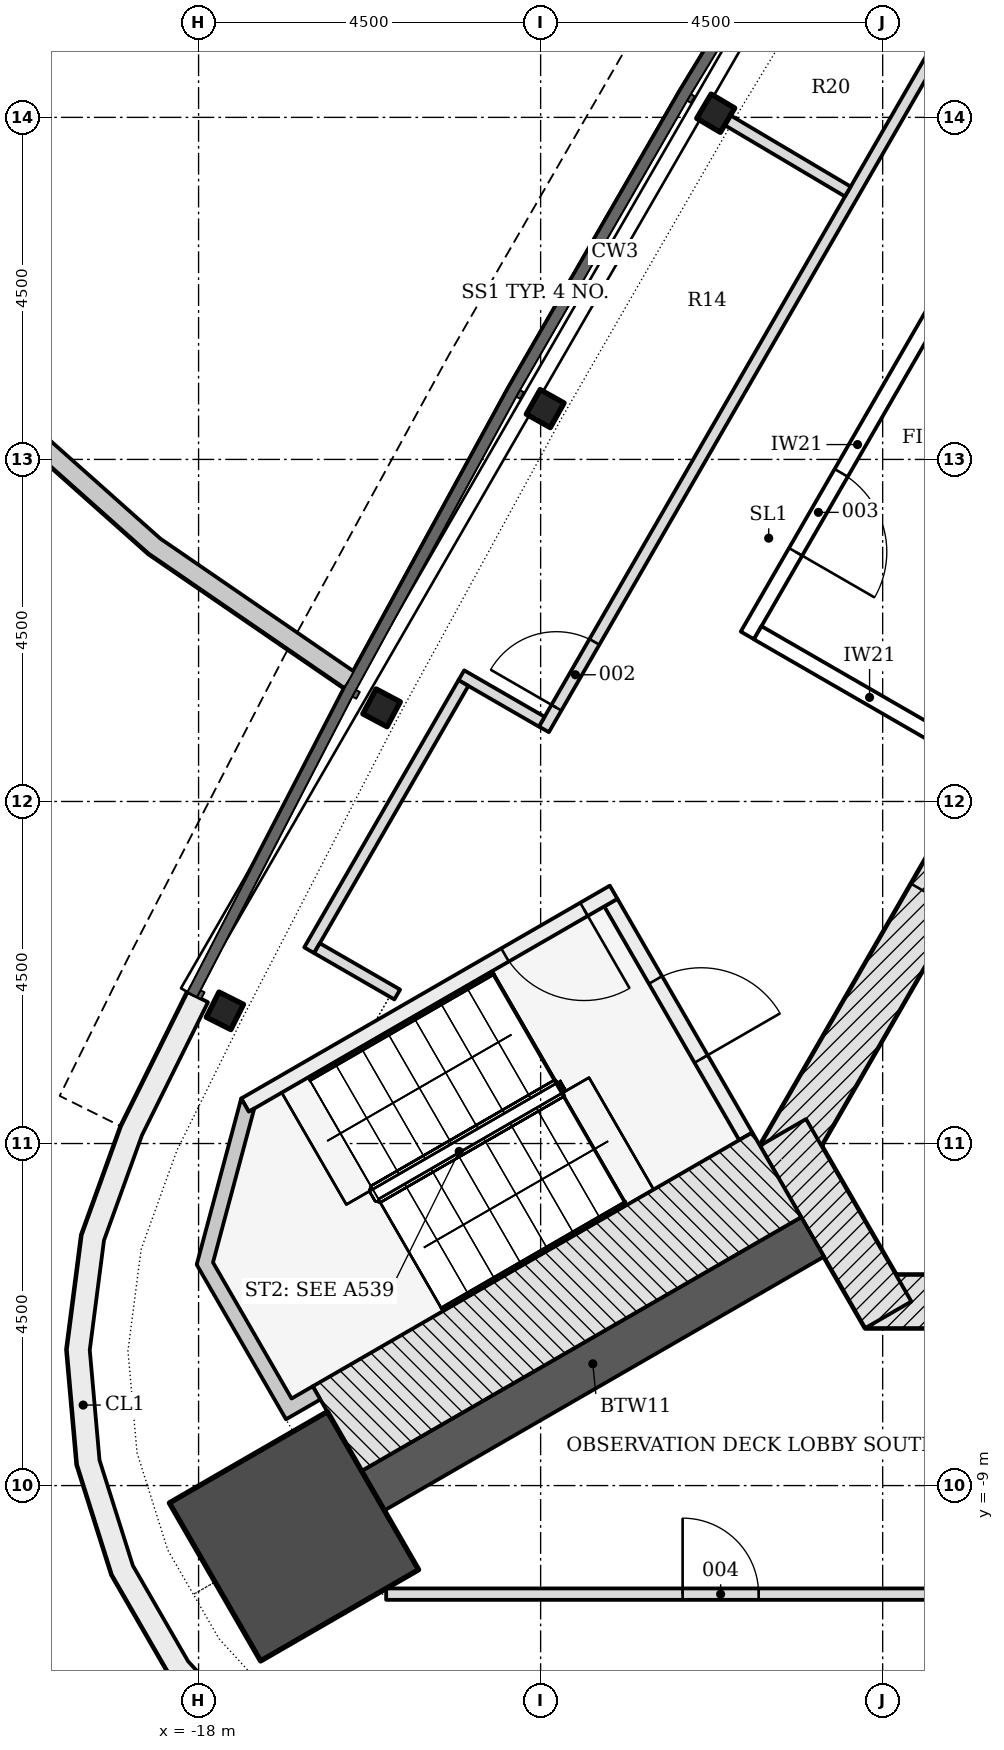
"""IFC4 building model, lengths in metres.
Left out: names, types, materials, properties, quantities, classifications, styles, units other than length and angle.
Written with IfcOpenShell. Run it as: python <this file> out.ifc"""

import sys

from ifc_helpers import new_model, si_unit, direction, frame, frame_2d, origin, origin_2d, place, context, subcontext, project, spatial, polyline, rectangle, i_section, outline, extrude, element, fill, save


model = new_model("IFC4")
c1 = context("Model", 3, precision=1e-05, world=origin(), true_north=direction((0.0, 1.0)))
c2 = subcontext(c1, "Body", "Model", "MODEL_VIEW")
j1 = project(units=[si_unit("LENGTHUNIT", "METRE"), si_unit("PLANEANGLEUNIT", "RADIAN")], contexts=[c1])
p1 = place(None, origin())
s1 = spatial("IfcSite", under=j1, at=p1, CompositionType="ELEMENT")
p2 = place(p1, origin())
s2 = spatial("IfcBuilding", under=s1, at=p2, CompositionType="ELEMENT")
p3 = place(p2, frame((0.0, 0.0, 274.2)))
s3 = spatial("IfcBuildingStorey", under=s2, at=p3, CompositionType="ELEMENT", Elevation=274.2)
p4 = place(p3, frame((-9.229, -6.578, -0.2), z_axis=(0.0, 0.0, 1.0), x_axis=(1.0, 0.0, 0.0)))
e1 = element("IfcWall", 1, at=p4, inside=s3, PredefinedType="SHEAR", context=c2, shape_type="SweptSolid", body=[
    extrude(rectangle(XDim=18.458, YDim=0.7, at=frame_2d((9.229, 0.0))), origin(), (0.0, 0.0, 1.0), 5.35),
])
p5 = place(p4, frame((8.7, 0.0, 0.2)))
e2 = element("IfcOpeningElement", 2, at=p5, cuts=e1, PredefinedType="OPENING", context=c2, shape_type="SweptSolid", body=[
    extrude(rectangle(XDim=1.0, YDim=2.1, at=frame_2d((0.5, 1.05))), frame((0.0, 0.36, 0.0), z_axis=(0.0, -1.0, 0.0), x_axis=(1.0, 0.0, 0.0)), (0.0, 0.0, 1.0), 0.72),
])
p6 = place(p4, frame((3.99, 0.0, 0.2)))
e3 = element("IfcOpeningElement", 3, at=p6, cuts=e1, PredefinedType="OPENING", context=c2, shape_type="SweptSolid", body=[
    extrude(rectangle(XDim=0.9, YDim=2.1, at=frame_2d((0.45, 1.05))), frame((0.0, 0.36, 0.0), z_axis=(0.0, -1.0, 0.0), x_axis=(1.0, 0.0, 0.0)), (0.0, 0.0, 1.0), 0.72),
])
p7 = place(p4, frame((13.539, 0.0, 0.2)))
e4 = element("IfcOpeningElement", 4, at=p7, cuts=e1, PredefinedType="OPENING", context=c2, shape_type="SweptSolid", body=[
    extrude(rectangle(XDim=0.9, YDim=2.1, at=frame_2d((0.45, 1.05))), frame((0.0, 0.36, 0.0), z_axis=(0.0, -1.0, 0.0), x_axis=(1.0, 0.0, 0.0)), (0.0, 0.0, 1.0), 0.72),
])
p8 = place(p3, frame((-1.083, 11.281, -0.2), z_axis=(0.0, 0.0, 1.0), x_axis=(-0.500001446645, -0.866024568562, 0.0)))
e5 = element("IfcWall", 5, at=p8, inside=s3, PredefinedType="SHEAR", context=c2, shape_type="SweptSolid", body=[
    extrude(rectangle(XDim=18.458, YDim=0.7, at=frame_2d((9.229, 0.0))), origin(), (0.0, 0.0, 1.0), 5.35),
])
p9 = place(p8, frame((8.979, 0.0, 0.2)))
e6 = element("IfcOpeningElement", 6, at=p9, cuts=e5, PredefinedType="OPENING", context=c2, shape_type="SweptSolid", body=[
    extrude(rectangle(XDim=1.2, YDim=2.1, at=frame_2d((0.6, 1.05))), frame((0.0, 0.36, 0.0), z_axis=(0.0, -1.0, 0.0), x_axis=(1.0, 0.0, 0.0)), (0.0, 0.0, 1.0), 0.72),
])
p10 = place(p8, frame((11.029, 0.0, 0.2)))
e7 = element("IfcOpeningElement", 7, at=p10, cuts=e5, PredefinedType="OPENING", context=c2, shape_type="SweptSolid", body=[
    extrude(rectangle(XDim=1.2, YDim=2.1, at=frame_2d((0.6, 1.05))), frame((0.0, 0.36, 0.0), z_axis=(0.0, -1.0, 0.0), x_axis=(1.0, 0.0, 0.0)), (0.0, 0.0, 1.0), 0.72),
])
p11 = place(p8, frame((13.179, 0.0, 0.2)))
e8 = element("IfcOpeningElement", 8, at=p11, cuts=e5, PredefinedType="OPENING", context=c2, shape_type="SweptSolid", body=[
    extrude(rectangle(XDim=1.3, YDim=2.1, at=frame_2d((0.65, 1.05))), frame((0.0, 0.36, 0.0), z_axis=(0.0, -1.0, 0.0), x_axis=(1.0, 0.0, 0.0)), (0.0, 0.0, 1.0), 0.72),
])
p12 = place(p3, frame((-10.311, -4.353, -0.2), z_axis=(0.0, 0.0, 1.0), x_axis=(0.500042739161, -0.866000726912, 0.0)))
e9 = element("IfcWall", 9, at=p12, inside=s3, PredefinedType="SHEAR", context=c2, shape_type="SweptSolid", body=[
    extrude(rectangle(XDim=2.771, YDim=0.7, at=frame_2d((1.386, 0.0))), origin(), (0.0, 0.0, 1.0), 5.35),
])
p13 = place(p3, frame((-9.922, -5.728, -0.2), z_axis=(0.0, 0.0, 1.0), x_axis=(-0.866032176823, -0.499988268569, 0.0)))
e10 = element("IfcWall", 10, at=p13, inside=s3, PredefinedType="SHEAR", context=c2, shape_type="SweptSolid", body=[
    extrude(rectangle(XDim=6.678, YDim=0.6, at=frame_2d((3.339, 0.0))), origin(), (0.0, 0.0, 1.0), 5.35),
])
p14 = place(p3, frame((-16.745, -9.667, -0.2), z_axis=(0.0, 0.0, 1.0), x_axis=(-0.866025403784, -0.5, 0.0)))
e11 = element("IfcColumn", 11, at=p14, inside=s3, PredefinedType="COLUMN", context=c2, shape_type="SweptSolid", body=[
    extrude(rectangle(XDim=2.4, YDim=2.4, at=origin_2d()), origin(), (0.0, 0.0, 1.0), 5.35),
])
for number, where, z_axis, x_axis in (
    (12, (-11.196, 9.055, -0.2), (0.0, 0.0, 1.0), (-0.51, -0.86, 0.0)),
    (13, (-13.44, 5.169, -0.2), (0.0, 0.0, 1.0), (-0.49, -0.872, 0.0)),
    (14, (-15.593, 1.232, -0.2), (0.0, 0.0, 1.0), (-0.47, -0.883, 0.0)),
    (15, (-17.654, -2.754, -0.2), (0.0, 0.0, 1.0), (-0.449, -0.894, 0.0)),
):
    element("IfcColumn", number, at=place(p3, frame(where, z_axis=z_axis, x_axis=x_axis)), inside=s3, PredefinedType="COLUMN", context=c2, shape_type="SweptSolid", body=[
        extrude(i_section(OverallWidth=0.371, OverallDepth=0.361, WebThickness=0.012, FlangeThickness=0.02, FilletRadius=0.015, at=origin_2d()), origin(), (0.0, 0.0, 1.0), 5.35),
    ])
p15 = place(p3, origin())
e16 = element("IfcWall", 16, at=p15, inside=s3, PredefinedType="NOTDEFINED", context=c2, shape_type="SweptSolid", body=[
    extrude(outline(polyline([(-18.145, -2.507), (-19.021, -4.273), (-19.538, -5.703), (-19.733, -7.21), (-19.599, -8.724), (-19.141, -10.174), (-18.381, -11.49), (-17.355, -12.611), (-16.111, -13.485), (-14.708, -14.069), (-13.211, -14.336), (-11.244, -14.46), (-11.225, -14.161), (-13.176, -14.038), (-14.623, -13.779), (-15.965, -13.22), (-17.156, -12.385), (-18.138, -11.312), (-18.865, -10.052), (-19.303, -8.665), (-19.432, -7.216), (-19.244, -5.774), (-18.745, -4.391), (-17.876, -2.64), (-18.145, -2.507)])), origin(), (0.0, 0.0, 1.0), 5.15),
])
p16 = place(p3, origin())
e17 = element("IfcWall", 17, at=p16, inside=s3, PredefinedType="PARAPET", context=c2, shape_type="SweptSolid", body=[
    extrude(outline(polyline([(-5.81, 18.61), (-8.585, 20.051), (-11.451, 21.107), (-14.298, 21.739), (-17.016, 21.922), (-19.5, 21.648), (-21.656, 20.929), (-23.4, 19.792), (-24.665, 18.28), (-25.403, 16.452), (-25.585, 14.378), (-25.205, 12.137), (-24.277, 9.817), (-22.836, 7.505), (-20.938, 5.291), (-18.656, 3.26), (-16.078, 1.49), (-15.937, 1.696), (-18.502, 3.457), (-20.759, 5.467), (-22.634, 7.653), (-24.053, 9.93), (-24.963, 12.205), (-25.333, 14.388), (-25.157, 16.393), (-24.448, 18.15), (-23.232, 19.603), (-21.546, 20.702), (-19.446, 21.403), (-17.01, 21.671), (-14.334, 21.491), (-11.522, 20.867), (-8.687, 19.822), (-5.925, 18.388), (-5.81, 18.61)])), origin(), (0.0, 0.0, 1.0), 1.1),
])
p17 = place(p3, frame((-12.576, -1.331, -0.2), z_axis=(0.0, 0.0, 1.0), x_axis=(0.499970499736, -0.8660424351, 0.0)))
e18 = element("IfcWall", 18, at=p17, inside=s3, PredefinedType="SHEAR", context=c2, shape_type="SweptSolid", body=[
    extrude(rectangle(XDim=3.55, YDim=0.2, at=frame_2d((1.775, 0.0))), origin(), (0.0, 0.0, 1.0), 5.35),
])
p18 = place(p17, frame((1.175, 0.0, 0.2)))
e19 = element("IfcOpeningElement", 19, at=p18, cuts=e18, PredefinedType="OPENING", context=c2, shape_type="SweptSolid", body=[
    extrude(rectangle(XDim=1.2, YDim=2.1, at=frame_2d((0.6, 1.05))), frame((0.0, 0.11, 0.0), z_axis=(0.0, -1.0, 0.0), x_axis=(1.0, 0.0, 0.0)), (0.0, 0.0, 1.0), 0.22),
])
p19 = place(p3, frame((-12.539, -1.194, -0.2), z_axis=(0.0, 0.0, 1.0), x_axis=(-0.866045472092, -0.499965239061, 0.0)))
e20 = element("IfcWall", 20, at=p19, inside=s3, PredefinedType="SHEAR", context=c2, shape_type="SweptSolid", body=[
    extrude(rectangle(XDim=5.6, YDim=0.2, at=frame_2d((2.8, 0.0))), origin(), (0.0, 0.0, 1.0), 5.35),
])
p20 = place(p19, frame((0.45, 0.0, 0.2)))
e21 = element("IfcOpeningElement", 21, at=p20, cuts=e20, PredefinedType="OPENING", context=c2, shape_type="SweptSolid", body=[
    extrude(rectangle(XDim=1.2, YDim=2.1, at=frame_2d((0.6, 1.05))), frame((0.0, 0.11, 0.0), z_axis=(0.0, -1.0, 0.0), x_axis=(1.0, 0.0, 0.0)), (0.0, 0.0, 1.0), 0.22),
])
p21 = place(p3, frame((-10.393, -4.912, -0.2), z_axis=(0.0, 0.0, 1.0), x_axis=(-0.866025486527, -0.499999856685, 0.0)))
e22 = element("IfcWall", 22, at=p21, inside=s3, PredefinedType="SHEAR", context=c2, shape_type="SweptSolid", body=[
    extrude(rectangle(XDim=6.679, YDim=1.286, at=frame_2d((3.339, 0.0))), origin(), (0.0, 0.0, 1.0), 5.35),
])
p22 = place(p3, frame((0.0, 0.0, -0.2)))
e23 = element("IfcWall", 23, at=p22, inside=s3, PredefinedType="SHEAR", context=c2, shape_type="SweptSolid", body=[
    extrude(outline(polyline([(-17.439, -3.907), (-18.025, -6.093), (-16.85, -8.128), (-16.398, -7.867), (-16.498, -7.694), (-16.498, -7.694), (-16.777, -7.855), (-17.81, -6.065), (-17.267, -4.039), (-17.339, -4.081), (-17.339, -4.081), (-17.339, -4.081), (-17.339, -4.081), (-17.339, -4.081), (-17.339, -4.081), (-17.339, -4.081), (-17.339, -4.081), (-17.339, -4.081), (-17.339, -4.081), (-17.339, -4.081), (-17.339, -4.081), (-17.339, -4.081), (-17.339, -4.081), (-17.339, -4.081), (-17.339, -4.081), (-17.339, -4.081), (-17.439, -3.907)])), origin(), (0.0, 0.0, 1.0), 5.35),
])
p23 = place(p3, frame((-7.881, 7.206, 0.0), z_axis=(0.0, 0.0, 1.0), x_axis=(-0.499988536525, -0.866032022124, 0.0)))
e24 = element("IfcWall", 24, at=p23, inside=s3, PredefinedType="PARTITIONING", context=c2, shape_type="SweptSolid", body=[
    extrude(rectangle(XDim=5.798, YDim=0.2, at=frame_2d((2.899, 0.0))), origin(), (0.0, 0.0, 1.0), 4.602),
])
p24 = place(p23, frame((3.329, 0.0, 0.0)))
e25 = element("IfcOpeningElement", 25, at=p24, cuts=e24, PredefinedType="OPENING", context=c2, shape_type="SweptSolid", body=[
    extrude(rectangle(XDim=1.2, YDim=2.1, at=frame_2d((0.6, 1.05))), frame((0.0, 0.11, 0.0), z_axis=(0.0, -1.0, 0.0), x_axis=(1.0, 0.0, 0.0)), (0.0, 0.0, 1.0), 0.22),
])
p25 = place(p3, frame((-10.645, 2.219, 0.0), z_axis=(0.0, 0.0, 1.0), x_axis=(0.866038511948, -0.499977295307, 0.0)))
e26 = element("IfcWall", 26, at=p25, inside=s3, PredefinedType="PARTITIONING", context=c2, shape_type="SweptSolid", body=[
    extrude(rectangle(XDim=3.4, YDim=0.2, at=frame_2d((1.7, 0.0))), origin(), (0.0, 0.0, 1.0), 5.15),
])
p26 = place(p3, frame((-13.457, 0.949, 0.0), z_axis=(0.0, 0.0, 1.0), x_axis=(0.500001340499, 0.866024629845, 0.0)))
e27 = element("IfcWall", 27, at=p26, inside=s3, PredefinedType="PARTITIONING", context=c2, shape_type="SweptSolid", body=[
    extrude(rectangle(XDim=22.632, YDim=0.15, at=frame_2d((11.316, 0.0))), origin(), (0.0, 0.0, 1.0), 4.602),
])
p27 = place(p26, frame((14.943, 0.0, 0.0)))
e28 = element("IfcOpeningElement", 28, at=p27, cuts=e27, PredefinedType="OPENING", context=c2, shape_type="SweptSolid", body=[
    extrude(rectangle(XDim=1.0, YDim=2.1, at=frame_2d((0.5, 1.05))), frame((0.0, 0.085, 0.0), z_axis=(0.0, -1.0, 0.0), x_axis=(1.0, 0.0, 0.0)), (0.0, 0.0, 1.0), 0.17),
])
p28 = place(p26, frame((0.329, 0.0, 0.0)))
e29 = element("IfcOpeningElement", 29, at=p28, cuts=e27, PredefinedType="OPENING", context=c2, shape_type="SweptSolid", body=[
    extrude(rectangle(XDim=1.0, YDim=2.1, at=frame_2d((0.5, 1.05))), frame((0.0, 0.085, 0.0), z_axis=(0.0, -1.0, 0.0), x_axis=(1.0, 0.0, 0.0)), (0.0, 0.0, 1.0), 0.17),
])
p29 = place(p3, frame((-11.046, 8.966, 0.0), z_axis=(0.0, 0.0, 1.0), x_axis=(0.860132404911, -0.510070824516, 0.0)))
e30 = element("IfcWall", 30, at=p29, inside=s3, PredefinedType="PARTITIONING", context=c2, shape_type="SweptSolid", body=[
    extrude(rectangle(XDim=1.845, YDim=0.15, at=frame_2d((0.922, 0.0))), origin(), (0.0, 0.0, 1.0), 4.602),
])
p30 = place(p3, frame((-13.485, 1.05, 0.0), z_axis=(0.0, 0.0, 1.0), x_axis=(-0.865995866851, 0.50005115598, 0.0)))
e31 = element("IfcWall", 31, at=p30, inside=s3, PredefinedType="PARTITIONING", context=c2, shape_type="SweptSolid", body=[
    extrude(rectangle(XDim=1.221, YDim=0.15, at=frame_2d((0.611, 0.0))), origin(), (0.0, 0.0, 1.0), 5.15),
])
p31 = place(p3, frame((-14.516, 1.558, 0.0), z_axis=(0.0, 0.0, 1.0), x_axis=(-0.499994954979, -0.866028316509, 0.0)))
e32 = element("IfcWall", 32, at=p31, inside=s3, PredefinedType="PARTITIONING", context=c2, shape_type="SweptSolid", body=[
    extrude(rectangle(XDim=4.059, YDim=0.15, at=frame_2d((2.029, 0.0))), origin(), (0.0, 0.0, 1.0), 4.602),
])
p32 = place(p3, frame((-16.443, -1.93, 0.0), z_axis=(0.0, 0.0, 1.0), x_axis=(0.866042269935, -0.499970785833, 0.0)))
e33 = element("IfcWall", 33, at=p32, inside=s3, PredefinedType="PARTITIONING", context=c2, shape_type="SweptSolid", body=[
    extrude(rectangle(XDim=1.22, YDim=0.15, at=frame_2d((0.61, 0.0))), origin(), (0.0, 0.0, 1.0), 5.15),
])
p33 = place(p3, frame((-15.532, -10.428, 0.0), z_axis=(0.0, 0.0, 1.0), x_axis=(1.0, 0.0, 0.0)))
e34 = element("IfcWall", 34, at=p33, inside=s3, PredefinedType="PARTITIONING", context=c2, shape_type="SweptSolid", body=[
    extrude(rectangle(XDim=21.439, YDim=0.15, at=frame_2d((10.719, 0.0))), origin(), (0.0, 0.0, 1.0), 4.602),
])
p34 = place(p33, frame((3.901, 0.0, 0.0)))
e35 = element("IfcOpeningElement", 35, at=p34, cuts=e34, PredefinedType="OPENING", context=c2, shape_type="SweptSolid", body=[
    extrude(rectangle(XDim=1.0, YDim=2.1, at=frame_2d((0.5, 1.05))), frame((0.0, 0.085, 0.0), z_axis=(0.0, -1.0, 0.0), x_axis=(1.0, 0.0, 0.0)), (0.0, 0.0, 1.0), 0.17),
])
p35 = place(p33, frame((12.533, 0.0, 0.0)))
e36 = element("IfcOpeningElement", 36, at=p35, cuts=e34, PredefinedType="OPENING", context=c2, shape_type="SweptSolid", body=[
    extrude(rectangle(XDim=1.8, YDim=2.1, at=frame_2d((0.9, 1.05))), frame((0.0, 0.085, 0.0), z_axis=(0.0, -1.0, 0.0), x_axis=(1.0, 0.0, 0.0)), (0.0, 0.0, 1.0), 0.17),
])
p36 = place(p18, origin())
e37 = element("IfcDoor", 37, at=p36, inside=s3, OperationType="SINGLE_SWING_RIGHT", PredefinedType="DOOR", context=c2, shape_type="SweptSolid", body=[
    extrude(rectangle(XDim=1.2, YDim=2.1, at=frame_2d((0.6, 1.05))), frame((0.0, 0.025, 0.0), z_axis=(0.0, -1.0, 0.0), x_axis=(1.0, 0.0, 0.0)), (0.0, 0.0, 1.0), 0.05),
])
fill(e19, e37)
p37 = place(p20, origin())
e38 = element("IfcDoor", 38, at=p37, inside=s3, OperationType="SINGLE_SWING_LEFT", PredefinedType="DOOR", context=c2, shape_type="SweptSolid", body=[
    extrude(rectangle(XDim=1.2, YDim=2.1, at=frame_2d((0.6, 1.05))), frame((0.0, 0.025, 0.0), z_axis=(0.0, -1.0, 0.0), x_axis=(1.0, 0.0, 0.0)), (0.0, 0.0, 1.0), 0.05),
])
fill(e21, e38)
p38 = place(p28, origin())
e39 = element("IfcDoor", 39, at=p38, inside=s3, OperationType="SINGLE_SWING_LEFT", PredefinedType="DOOR", context=c2, shape_type="SweptSolid", body=[
    extrude(rectangle(XDim=1.0, YDim=2.1, at=frame_2d((0.5, 1.05))), frame((0.0, 0.025, 0.0), z_axis=(0.0, -1.0, 0.0), x_axis=(1.0, 0.0, 0.0)), (0.0, 0.0, 1.0), 0.05),
])
fill(e29, e39)
p39 = place(p24, origin())
e40 = element("IfcDoor", 40, at=p39, inside=s3, OperationType="SINGLE_SWING_RIGHT", PredefinedType="DOOR", context=c2, shape_type="SweptSolid", body=[
    extrude(rectangle(XDim=1.2, YDim=2.1, at=frame_2d((0.6, 1.05))), frame((0.0, 0.025, 0.0), z_axis=(0.0, -1.0, 0.0), x_axis=(1.0, 0.0, 0.0)), (0.0, 0.0, 1.0), 0.05),
])
fill(e25, e40)
p40 = place(p34, origin())
e41 = element("IfcDoor", 41, at=p40, inside=s3, OperationType="SINGLE_SWING_LEFT", PredefinedType="DOOR", context=c2, shape_type="SweptSolid", body=[
    extrude(rectangle(XDim=1.0, YDim=2.1, at=frame_2d((0.5, 1.05))), frame((0.0, 0.025, 0.0), z_axis=(0.0, -1.0, 0.0), x_axis=(1.0, 0.0, 0.0)), (0.0, 0.0, 1.0), 0.05),
])
fill(e35, e41)
save(model, sys.argv[1])
